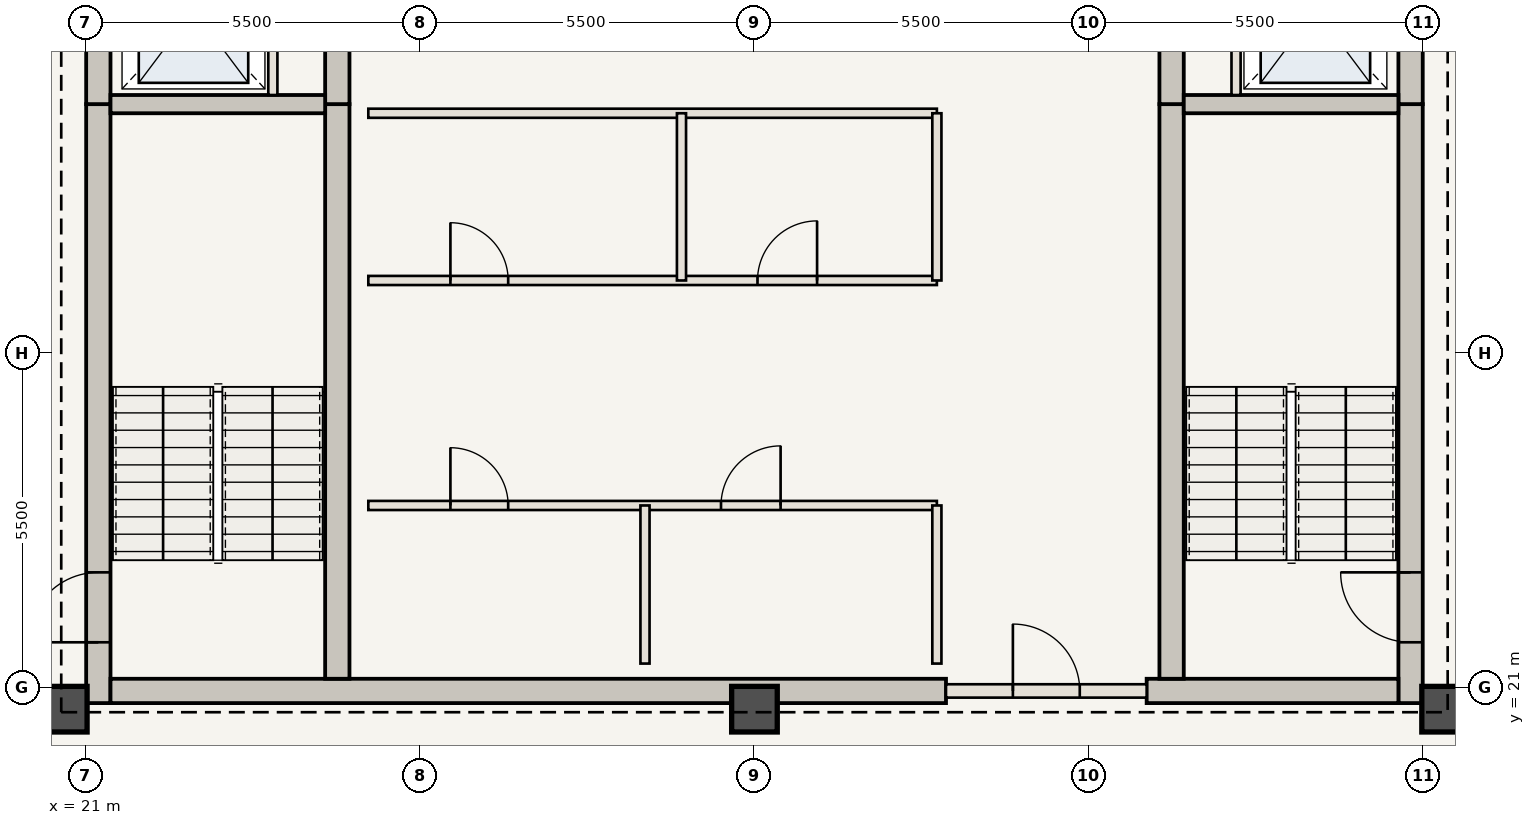
"""IFC4 building model, lengths in metres.
Left out: names, types, materials, properties, quantities, classifications, styles, units other than length and angle.
Written with IfcOpenShell. Run it as: python <this file> out.ifc"""

import sys

from ifc_helpers import new_model, si_unit, direction, frame, frame_2d, origin, origin_2d, place, context, subcontext, project, spatial, rectangle, extrude, element, fill, save


model = new_model("IFC4")
c1 = context("Model", 3, precision=1e-05, world=origin(), true_north=direction((0.0, 1.0)))
c2 = subcontext(c1, "Body", "Model", "MODEL_VIEW")
j1 = project(units=[si_unit("LENGTHUNIT", "METRE"), si_unit("PLANEANGLEUNIT", "RADIAN")], contexts=[c1])
p1 = place(None, origin())
s1 = spatial("IfcSite", under=j1, at=p1, CompositionType="ELEMENT")
p2 = place(p1, origin())
s2 = spatial("IfcBuilding", under=s1, at=p2, CompositionType="ELEMENT")
p3 = place(p2, frame((0.0, 0.0, 285.25)))
s3 = spatial("IfcBuildingStorey", under=s2, at=p3, CompositionType="ELEMENT", Elevation=285.25)
p4 = place(p3, frame((21.21, 20.75, 0.0), z_axis=(0.0, 0.0, 1.0), x_axis=(0.0, 1.0, 0.0)))
e1 = element("IfcWall", 1, at=p4, inside=s3, PredefinedType="SHEAR", context=c2, shape_type="SweptSolid", body=[
    extrude(rectangle(XDim=9.85, YDim=0.4, at=frame_2d((4.925, 0.0))), origin(), (0.0, 0.0, 1.0), 3.85),
])
p5 = place(p4, frame((1.0, 0.0, 0.0)))
e2 = element("IfcOpeningElement", 2, at=p5, cuts=e1, PredefinedType="OPENING", context=c2, shape_type="SweptSolid", body=[
    extrude(rectangle(XDim=1.15, YDim=2.15, at=frame_2d((0.575, 1.075))), frame((0.0, 0.21, 0.0), z_axis=(0.0, -1.0, 0.0), x_axis=(1.0, 0.0, 0.0)), (0.0, 0.0, 1.0), 0.42),
])
p6 = place(p3, frame((21.21, 30.6, 0.0), z_axis=(0.0, 0.0, 1.0), x_axis=(0.0, 1.0, 0.0)))
e3 = element("IfcWall", 3, at=p6, inside=s3, PredefinedType="SHEAR", context=c2, shape_type="SweptSolid", body=[
    extrude(rectangle(XDim=12.6, YDim=0.4, at=frame_2d((6.3, 0.0))), origin(), (0.0, 0.0, 1.0), 3.85),
])
p7 = place(p6, frame((4.2, 0.0, 0.0)))
e4 = element("IfcOpeningElement", 4, at=p7, cuts=e3, PredefinedType="OPENING", context=c2, shape_type="SweptSolid", body=[
    extrude(rectangle(XDim=1.1, YDim=2.15, at=frame_2d((0.55, 1.075))), frame((0.0, 0.21, 0.0), z_axis=(0.0, -1.0, 0.0), x_axis=(1.0, 0.0, 0.0)), (0.0, 0.0, 1.0), 0.42),
])
p8 = place(p6, frame((9.2, 0.0, 0.0)))
e5 = element("IfcOpeningElement", 5, at=p8, cuts=e3, PredefinedType="OPENING", context=c2, shape_type="SweptSolid", body=[
    extrude(rectangle(XDim=0.92, YDim=2.1, at=frame_2d((0.46, 1.05))), frame((0.0, 0.21, 0.0), z_axis=(0.0, -1.0, 0.0), x_axis=(1.0, 0.0, 0.0)), (0.0, 0.0, 1.0), 0.42),
])
p9 = place(p3, frame((42.79, 20.75, 0.0), z_axis=(0.0, 0.0, 1.0), x_axis=(0.0, 1.0, 0.0)))
e6 = element("IfcWall", 6, at=p9, inside=s3, PredefinedType="SHEAR", context=c2, shape_type="SweptSolid", body=[
    extrude(rectangle(XDim=9.85, YDim=0.4, at=frame_2d((4.925, 0.0))), origin(), (0.0, 0.0, 1.0), 3.85),
])
p10 = place(p9, frame((1.0, 0.0, 0.0)))
e7 = element("IfcOpeningElement", 7, at=p10, cuts=e6, PredefinedType="OPENING", context=c2, shape_type="SweptSolid", body=[
    extrude(rectangle(XDim=1.15, YDim=2.15, at=frame_2d((0.575, 1.075))), frame((0.0, 0.21, 0.0), z_axis=(0.0, -1.0, 0.0), x_axis=(1.0, 0.0, 0.0)), (0.0, 0.0, 1.0), 0.42),
])
p11 = place(p3, frame((42.79, 30.6, 0.0), z_axis=(0.0, 0.0, 1.0), x_axis=(0.0, 1.0, 0.0)))
e8 = element("IfcWall", 8, at=p11, inside=s3, PredefinedType="SHEAR", context=c2, shape_type="SweptSolid", body=[
    extrude(rectangle(XDim=12.6, YDim=0.4, at=frame_2d((6.3, 0.0))), origin(), (0.0, 0.0, 1.0), 3.85),
])
p12 = place(p11, frame((4.2, 0.0, 0.0)))
e9 = element("IfcOpeningElement", 9, at=p12, cuts=e8, PredefinedType="OPENING", context=c2, shape_type="SweptSolid", body=[
    extrude(rectangle(XDim=1.1, YDim=2.15, at=frame_2d((0.55, 1.075))), frame((0.0, 0.21, 0.0), z_axis=(0.0, -1.0, 0.0), x_axis=(1.0, 0.0, 0.0)), (0.0, 0.0, 1.0), 0.42),
])
p13 = place(p11, frame((8.4, 0.0, 0.0)))
e10 = element("IfcOpeningElement", 10, at=p13, cuts=e8, PredefinedType="OPENING", context=c2, shape_type="SweptSolid", body=[
    extrude(rectangle(XDim=0.88, YDim=2.1, at=frame_2d((0.44, 1.05))), frame((0.0, 0.21, 0.0), z_axis=(0.0, -1.0, 0.0), x_axis=(1.0, 0.0, 0.0)), (0.0, 0.0, 1.0), 0.42),
])
p14 = place(p11, frame((10.5, 0.0, 0.0)))
e11 = element("IfcOpeningElement", 11, at=p14, cuts=e8, PredefinedType="OPENING", context=c2, shape_type="SweptSolid", body=[
    extrude(rectangle(XDim=0.88, YDim=2.1, at=frame_2d((0.44, 1.05))), frame((0.0, 0.21, 0.0), z_axis=(0.0, -1.0, 0.0), x_axis=(1.0, 0.0, 0.0)), (0.0, 0.0, 1.0), 0.42),
])
p15 = place(p3, frame((21.41, 20.95, 0.0), z_axis=(0.0, 0.0, 1.0), x_axis=(1.0, 0.0, 0.0)))
e12 = element("IfcWall", 12, at=p15, inside=s3, PredefinedType="SHEAR", context=c2, shape_type="SweptSolid", body=[
    extrude(rectangle(XDim=13.74, YDim=0.4, at=frame_2d((6.87, 0.0))), origin(), (0.0, 0.0, 1.0), 3.85),
])
p16 = place(p3, frame((38.45, 20.95, 0.0), z_axis=(0.0, 0.0, 1.0), x_axis=(1.0, 0.0, 0.0)))
e13 = element("IfcWall", 13, at=p16, inside=s3, PredefinedType="SHEAR", context=c2, shape_type="SweptSolid", body=[
    extrude(rectangle(XDim=4.14, YDim=0.4, at=frame_2d((2.07, 0.0))), origin(), (0.0, 0.0, 1.0), 3.85),
])
p17 = place(p3, frame((25.14, 21.15, 0.0), z_axis=(0.0, 0.0, 1.0), x_axis=(0.0, 1.0, 0.0)))
e14 = element("IfcWall", 14, at=p17, inside=s3, PredefinedType="SHEAR", context=c2, shape_type="SweptSolid", body=[
    extrude(rectangle(XDim=9.45, YDim=0.4, at=frame_2d((4.725, 0.0))), origin(), (0.0, 0.0, 1.0), 3.85),
])
p18 = place(p3, frame((25.14, 30.6, 0.0), z_axis=(0.0, 0.0, 1.0), x_axis=(0.0, 1.0, 0.0)))
e15 = element("IfcWall", 15, at=p18, inside=s3, PredefinedType="SHEAR", context=c2, shape_type="SweptSolid", body=[
    extrude(rectangle(XDim=12.2, YDim=0.4, at=frame_2d((6.1, 0.0))), origin(), (0.0, 0.0, 1.0), 3.85),
])
p19 = place(p18, frame((6.25, 0.0, 0.0)))
e16 = element("IfcOpeningElement", 16, at=p19, cuts=e15, PredefinedType="OPENING", context=c2, shape_type="SweptSolid", body=[
    extrude(rectangle(XDim=1.1, YDim=2.15, at=frame_2d((0.55, 1.075))), frame((0.0, 0.21, 0.0), z_axis=(0.0, -1.0, 0.0), x_axis=(1.0, 0.0, 0.0)), (0.0, 0.0, 1.0), 0.42),
])
p20 = place(p3, frame((38.86, 21.15, 0.0), z_axis=(0.0, 0.0, 1.0), x_axis=(0.0, 1.0, 0.0)))
e17 = element("IfcWall", 17, at=p20, inside=s3, PredefinedType="SHEAR", context=c2, shape_type="SweptSolid", body=[
    extrude(rectangle(XDim=9.45, YDim=0.4, at=frame_2d((4.725, 0.0))), origin(), (0.0, 0.0, 1.0), 3.85),
])
p21 = place(p3, frame((38.86, 30.6, 0.0), z_axis=(0.0, 0.0, 1.0), x_axis=(0.0, 1.0, 0.0)))
e18 = element("IfcWall", 18, at=p21, inside=s3, PredefinedType="SHEAR", context=c2, shape_type="SweptSolid", body=[
    extrude(rectangle(XDim=12.2, YDim=0.4, at=frame_2d((6.1, 0.0))), origin(), (0.0, 0.0, 1.0), 3.85),
])
for number, where, z_axis, x_axis in (
    (19, (20.65, 20.65, 0.0), (0.0, 0.0, 1.0), (1.0, 0.0, 0.0)),
    (20, (32.0, 20.65, 0.0), (0.0, 0.0, 1.0), (1.0, 0.0, 0.0)),
    (21, (43.35, 20.65, 0.0), (0.0, 0.0, 1.0), (1.0, 0.0, 0.0)),
):
    element("IfcColumn", number, at=place(p3, frame(where, z_axis=z_axis, x_axis=x_axis)), inside=s3, PredefinedType="COLUMN", context=c2, shape_type="SweptSolid", body=[
        extrude(rectangle(XDim=0.75, YDim=0.75, at=origin_2d()), origin(), (0.0, 0.0, 1.0), 3.85),
    ])
for number, where, z_axis, x_axis in (
    (22, (21.41, 30.6, 0.0), (0.0, 0.0, 1.0), (1.0, 0.0, 0.0)),
    (23, (39.06, 30.6, 0.0), (0.0, 0.0, 1.0), (1.0, 0.0, 0.0)),
):
    element("IfcWall", number, at=place(p3, frame(where, z_axis=z_axis, x_axis=x_axis)), inside=s3, PredefinedType="SHEAR", context=c2, shape_type="SweptSolid", body=[
        extrude(rectangle(XDim=3.53, YDim=0.3, at=frame_2d((1.765, 0.0))), origin(), (0.0, 0.0, 1.0), 3.685),
    ])
for number, where, z_axis, x_axis in (
    (24, (24.08, 30.75, 0.0), (0.0, 0.0, 1.0), (0.0, 1.0, 0.0)),
    (25, (39.92, 30.75, 0.0), (0.0, 0.0, 1.0), (0.0, 1.0, 0.0)),
):
    element("IfcWall", number, at=place(p3, frame(where, z_axis=z_axis, x_axis=x_axis)), inside=s3, PredefinedType="STANDARD", context=c2, shape_type="SweptSolid", body=[
        extrude(rectangle(XDim=2.65, YDim=0.15, at=frame_2d((1.325, 0.0))), origin(), (0.0, 0.0, 1.0), 3.685),
    ])
p22 = place(p3, frame((35.15, 20.95, 0.0), z_axis=(0.0, 0.0, 1.0), x_axis=(1.0, 0.0, 0.0)))
e26 = element("IfcWall", 26, at=p22, inside=s3, PredefinedType="STANDARD", context=c2, shape_type="SweptSolid", body=[
    extrude(rectangle(XDim=3.3, YDim=0.22, at=frame_2d((1.65, 0.0))), origin(), (0.0, 0.0, 1.0), 3.685),
])
p23 = place(p22, frame((1.1, 0.0, 0.0)))
e27 = element("IfcOpeningElement", 27, at=p23, cuts=e26, PredefinedType="OPENING", context=c2, shape_type="SweptSolid", body=[
    extrude(rectangle(XDim=1.1, YDim=2.15, at=frame_2d((0.55, 1.075))), frame((0.0, 0.12, 0.0), z_axis=(0.0, -1.0, 0.0), x_axis=(1.0, 0.0, 0.0)), (0.0, 0.0, 1.0), 0.24),
])
p24 = place(p3, frame((25.65, 24.0, 0.0), z_axis=(0.0, 0.0, 1.0), x_axis=(1.0, 0.0, 0.0)))
e28 = element("IfcWall", 28, at=p24, inside=s3, PredefinedType="STANDARD", context=c2, shape_type="SweptSolid", body=[
    extrude(rectangle(XDim=9.35, YDim=0.15, at=frame_2d((4.675, 0.0))), origin(), (0.0, 0.0, 1.0), 3.685),
])
p25 = place(p24, frame((1.35, 0.0, 0.0)))
e29 = element("IfcOpeningElement", 29, at=p25, cuts=e28, PredefinedType="OPENING", context=c2, shape_type="SweptSolid", body=[
    extrude(rectangle(XDim=0.95, YDim=2.15, at=frame_2d((0.475, 1.075))), frame((0.0, 0.085, 0.0), z_axis=(0.0, -1.0, 0.0), x_axis=(1.0, 0.0, 0.0)), (0.0, 0.0, 1.0), 0.17),
])
p26 = place(p24, frame((5.8, 0.0, 0.0)))
e30 = element("IfcOpeningElement", 30, at=p26, cuts=e28, PredefinedType="OPENING", context=c2, shape_type="SweptSolid", body=[
    extrude(rectangle(XDim=0.98, YDim=2.2, at=frame_2d((0.49, 1.1))), frame((0.0, 0.085, 0.0), z_axis=(0.0, -1.0, 0.0), x_axis=(1.0, 0.0, 0.0)), (0.0, 0.0, 1.0), 0.17),
])
for number, where, z_axis, x_axis in (
    (31, (30.2, 21.4, 0.0), (0.0, 0.0, 1.0), (0.0, 1.0, 0.0)),
    (32, (35.0, 21.4, 0.0), (0.0, 0.0, 1.0), (0.0, 1.0, 0.0)),
):
    element("IfcWall", number, at=place(p3, frame(where, z_axis=z_axis, x_axis=x_axis)), inside=s3, PredefinedType="STANDARD", context=c2, shape_type="SweptSolid", body=[
        extrude(rectangle(XDim=2.6, YDim=0.15, at=frame_2d((1.3, 0.0))), origin(), (0.0, 0.0, 1.0), 3.685),
    ])
p27 = place(p3, frame((25.65, 27.7, 0.0), z_axis=(0.0, 0.0, 1.0), x_axis=(1.0, 0.0, 0.0)))
e33 = element("IfcWall", 33, at=p27, inside=s3, PredefinedType="STANDARD", context=c2, shape_type="SweptSolid", body=[
    extrude(rectangle(XDim=9.35, YDim=0.15, at=frame_2d((4.675, 0.0))), origin(), (0.0, 0.0, 1.0), 3.685),
])
p28 = place(p27, frame((1.35, 0.0, 0.0)))
e34 = element("IfcOpeningElement", 34, at=p28, cuts=e33, PredefinedType="OPENING", context=c2, shape_type="SweptSolid", body=[
    extrude(rectangle(XDim=0.95, YDim=2.15, at=frame_2d((0.475, 1.075))), frame((0.0, 0.085, 0.0), z_axis=(0.0, -1.0, 0.0), x_axis=(1.0, 0.0, 0.0)), (0.0, 0.0, 1.0), 0.17),
])
p29 = place(p27, frame((6.4, 0.0, 0.0)))
e35 = element("IfcOpeningElement", 35, at=p29, cuts=e33, PredefinedType="OPENING", context=c2, shape_type="SweptSolid", body=[
    extrude(rectangle(XDim=0.98, YDim=2.2, at=frame_2d((0.49, 1.1))), frame((0.0, 0.085, 0.0), z_axis=(0.0, -1.0, 0.0), x_axis=(1.0, 0.0, 0.0)), (0.0, 0.0, 1.0), 0.17),
])
p30 = place(p3, frame((25.65, 30.45, 0.0), z_axis=(0.0, 0.0, 1.0), x_axis=(1.0, 0.0, 0.0)))
e36 = element("IfcWall", 36, at=p30, inside=s3, PredefinedType="STANDARD", context=c2, shape_type="SweptSolid", body=[
    extrude(rectangle(XDim=9.35, YDim=0.15, at=frame_2d((4.675, 0.0))), origin(), (0.0, 0.0, 1.0), 3.685),
])
for number, where, z_axis, x_axis in (
    (37, (30.8, 27.7, 0.0), (0.0, 0.0, 1.0), (0.0, 1.0, 0.0)),
    (38, (35.0, 27.7, 0.0), (0.0, 0.0, 1.0), (0.0, 1.0, 0.0)),
):
    element("IfcWall", number, at=place(p3, frame(where, z_axis=z_axis, x_axis=x_axis)), inside=s3, PredefinedType="STANDARD", context=c2, shape_type="SweptSolid", body=[
        extrude(rectangle(XDim=2.75, YDim=0.15, at=frame_2d((1.375, 0.0))), origin(), (0.0, 0.0, 1.0), 3.685),
    ])
p31 = place(p5, origin())
e39 = element("IfcDoor", 39, at=p31, inside=s3, OperationType="SINGLE_SWING_LEFT", PredefinedType="DOOR", context=c2, shape_type="SweptSolid", body=[
    extrude(rectangle(XDim=1.15, YDim=2.15, at=frame_2d((0.575, 1.075))), frame((0.0, 0.025, 0.0), z_axis=(0.0, -1.0, 0.0), x_axis=(1.0, 0.0, 0.0)), (0.0, 0.0, 1.0), 0.05),
])
fill(e2, e39)
p32 = place(p10, origin())
e40 = element("IfcDoor", 40, at=p32, inside=s3, OperationType="SINGLE_SWING_RIGHT", PredefinedType="DOOR", context=c2, shape_type="SweptSolid", body=[
    extrude(rectangle(XDim=1.15, YDim=2.15, at=frame_2d((0.575, 1.075))), frame((0.0, 0.025, 0.0), z_axis=(0.0, -1.0, 0.0), x_axis=(1.0, 0.0, 0.0)), (0.0, 0.0, 1.0), 0.05),
])
fill(e7, e40)
p33 = place(p23, origin())
e41 = element("IfcDoor", 41, at=p33, inside=s3, OperationType="SINGLE_SWING_LEFT", PredefinedType="DOOR", context=c2, shape_type="SweptSolid", body=[
    extrude(rectangle(XDim=1.1, YDim=2.15, at=frame_2d((0.55, 1.075))), frame((0.0, 0.025, 0.0), z_axis=(0.0, -1.0, 0.0), x_axis=(1.0, 0.0, 0.0)), (0.0, 0.0, 1.0), 0.05),
])
fill(e27, e41)
p34 = place(p25, origin())
e42 = element("IfcDoor", 42, at=p34, inside=s3, OperationType="SINGLE_SWING_LEFT", PredefinedType="DOOR", context=c2, shape_type="SweptSolid", body=[
    extrude(rectangle(XDim=0.95, YDim=2.15, at=frame_2d((0.475, 1.075))), frame((0.0, 0.025, 0.0), z_axis=(0.0, -1.0, 0.0), x_axis=(1.0, 0.0, 0.0)), (0.0, 0.0, 1.0), 0.05),
])
fill(e29, e42)
p35 = place(p26, origin())
e43 = element("IfcDoor", 43, at=p35, inside=s3, OperationType="SINGLE_SWING_RIGHT", PredefinedType="DOOR", context=c2, shape_type="SweptSolid", body=[
    extrude(rectangle(XDim=0.98, YDim=2.2, at=frame_2d((0.49, 1.1))), frame((0.0, 0.025, 0.0), z_axis=(0.0, -1.0, 0.0), x_axis=(1.0, 0.0, 0.0)), (0.0, 0.0, 1.0), 0.05),
])
fill(e30, e43)
p36 = place(p28, origin())
e44 = element("IfcDoor", 44, at=p36, inside=s3, OperationType="SINGLE_SWING_LEFT", PredefinedType="DOOR", context=c2, shape_type="SweptSolid", body=[
    extrude(rectangle(XDim=0.95, YDim=2.15, at=frame_2d((0.475, 1.075))), frame((0.0, 0.025, 0.0), z_axis=(0.0, -1.0, 0.0), x_axis=(1.0, 0.0, 0.0)), (0.0, 0.0, 1.0), 0.05),
])
fill(e34, e44)
p37 = place(p29, origin())
e45 = element("IfcDoor", 45, at=p37, inside=s3, OperationType="SINGLE_SWING_RIGHT", PredefinedType="DOOR", context=c2, shape_type="SweptSolid", body=[
    extrude(rectangle(XDim=0.98, YDim=2.2, at=frame_2d((0.49, 1.1))), frame((0.0, 0.025, 0.0), z_axis=(0.0, -1.0, 0.0), x_axis=(1.0, 0.0, 0.0)), (0.0, 0.0, 1.0), 0.05),
])
fill(e35, e45)
save(model, sys.argv[1])
